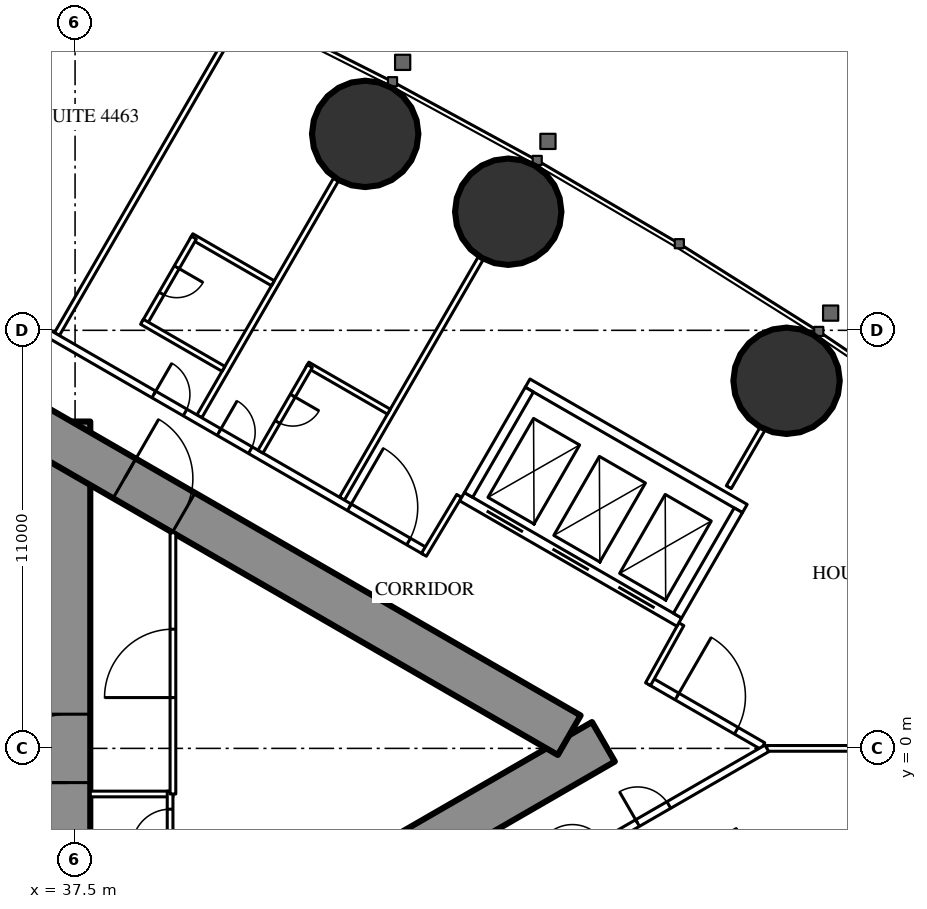
"""IFC4 building model, lengths in metres.
Left out: names, types, materials, properties, quantities, classifications, styles, units other than length and angle.
Written with IfcOpenShell. Run it as: python <this file> out.ifc"""

import sys

from ifc_helpers import new_model, si_unit, direction, frame, frame_2d, origin, origin_2d, place, context, subcontext, project, spatial, rectangle, circle, extrude, element, fill, save


model = new_model("IFC4")
c1 = context("Model", 3, precision=1e-05, world=origin(), true_north=direction((0.0, 1.0)))
c2 = subcontext(c1, "Body", "Model", "MODEL_VIEW")
j1 = project(units=[si_unit("LENGTHUNIT", "METRE"), si_unit("PLANEANGLEUNIT", "RADIAN")], contexts=[c1])
p1 = place(None, origin())
s1 = spatial("IfcSite", under=j1, at=p1, CompositionType="ELEMENT")
p2 = place(p1, origin())
s2 = spatial("IfcBuilding", under=s1, at=p2, CompositionType="ELEMENT")
p3 = place(p2, frame((0.0, 0.0, 166.8)))
s3 = spatial("IfcBuildingStorey", under=s2, at=p3, CompositionType="ELEMENT", Elevation=166.8)
for number, where, z_axis, x_axis in (
    (1, (56.221, 9.672, 0.0), (0.0, 0.0, 1.0), (1.0, 0.0, 0.0)),
    (2, (48.897, 14.121, 0.0), (0.0, 0.0, 1.0), (1.0, 0.0, 0.0)),
    (3, (45.134, 16.168, 0.0), (0.0, 0.0, 1.0), (1.0, 0.0, 0.0)),
):
    element("IfcColumn", number, at=place(p3, frame(where, z_axis=z_axis, x_axis=x_axis)), inside=s3, PredefinedType="COLUMN", context=c2, shape_type="SweptSolid", body=[
        extrude(circle(Radius=1.4, at=origin_2d()), origin(), (0.0, 0.0, 1.0), 3.5),
    ])
p4 = place(p3, frame((37.3, -8.6, 0.0), z_axis=(0.0, 0.0, 1.0), x_axis=(0.0, 1.0, 0.0)))
e4 = element("IfcWall", 4, at=p4, inside=s3, PredefinedType="SHEAR", context=c2, shape_type="SweptSolid", body=[
    extrude(rectangle(XDim=17.2, YDim=1.2, at=frame_2d((8.6, 0.0))), origin(), (0.0, 0.0, 1.0), 3.5),
])
p5 = place(p4, frame((7.7, 0.0, 0.0)))
e5 = element("IfcOpeningElement", 5, at=p5, cuts=e4, PredefinedType="OPENING", context=c2, shape_type="SweptSolid", body=[
    extrude(rectangle(XDim=1.8, YDim=2.2, at=frame_2d((0.9, 1.1))), frame((0.0, 0.61, 0.0), z_axis=(0.0, -1.0, 0.0), x_axis=(1.0, 0.0, 0.0)), (0.0, 0.0, 1.0), 1.22),
])
p6 = place(p3, frame((27.2, -13.8, 0.0), z_axis=(0.0, 0.0, 1.0), x_axis=(0.866027159892, 0.499996958321, 0.0)))
e6 = element("IfcWall", 6, at=p6, inside=s3, PredefinedType="SHEAR", context=c2, shape_type="SweptSolid", body=[
    extrude(rectangle(XDim=27.947, YDim=1.2, at=frame_2d((13.973, 0.0))), origin(), (0.0, 0.0, 1.0), 3.5),
])
p7 = place(p6, frame((4.6, 0.0, 0.0)))
e7 = element("IfcOpeningElement", 7, at=p7, cuts=e6, PredefinedType="OPENING", context=c2, shape_type="SweptSolid", body=[
    extrude(rectangle(XDim=1.0, YDim=2.2, at=frame_2d((0.5, 1.1))), frame((0.0, 0.61, 0.0), z_axis=(0.0, -1.0, 0.0), x_axis=(1.0, 0.0, 0.0)), (0.0, 0.0, 1.0), 1.22),
])
p8 = place(p6, frame((13.395, 0.0, 0.0)))
e8 = element("IfcOpeningElement", 8, at=p8, cuts=e6, PredefinedType="OPENING", context=c2, shape_type="SweptSolid", body=[
    extrude(rectangle(XDim=1.8, YDim=2.2, at=frame_2d((0.9, 1.1))), frame((0.0, 0.61, 0.0), z_axis=(0.0, -1.0, 0.0), x_axis=(1.0, 0.0, 0.0)), (0.0, 0.0, 1.0), 1.22),
])
p9 = place(p3, frame((27.2, 13.8, 0.0), z_axis=(0.0, 0.0, 1.0), x_axis=(0.866024515034, -0.500001539357, 0.0)))
e9 = element("IfcWall", 9, at=p9, inside=s3, PredefinedType="SHEAR", context=c2, shape_type="SweptSolid", body=[
    extrude(rectangle(XDim=26.907, YDim=1.2, at=frame_2d((13.454, 0.0))), origin(), (0.0, 0.0, 1.0), 3.5),
])
p10 = place(p9, frame((4.6, 0.0, 0.0)))
e10 = element("IfcOpeningElement", 10, at=p10, cuts=e9, PredefinedType="OPENING", context=c2, shape_type="SweptSolid", body=[
    extrude(rectangle(XDim=1.0, YDim=2.2, at=frame_2d((0.5, 1.1))), frame((0.0, 0.61, 0.0), z_axis=(0.0, -1.0, 0.0), x_axis=(1.0, 0.0, 0.0)), (0.0, 0.0, 1.0), 1.22),
])
p11 = place(p9, frame((13.395, 0.0, 0.0)))
e11 = element("IfcOpeningElement", 11, at=p11, cuts=e9, PredefinedType="OPENING", context=c2, shape_type="SweptSolid", body=[
    extrude(rectangle(XDim=1.8, YDim=2.2, at=frame_2d((0.9, 1.1))), frame((0.0, 0.61, 0.0), z_axis=(0.0, -1.0, 0.0), x_axis=(1.0, 0.0, 0.0)), (0.0, 0.0, 1.0), 1.22),
])
p12 = place(p3, frame((37.022, 10.9, 0.0), z_axis=(0.0, 0.0, 1.0), x_axis=(0.499998620953, 0.866026199976, 0.0)))
e12 = element("IfcWall", 12, at=p12, inside=s3, PredefinedType="PARTITIONING", context=c2, shape_type="SweptSolid", body=[
    extrude(rectangle(XDim=9.77, YDim=0.15, at=frame_2d((4.885, 0.0))), origin(), (0.0, 0.0, 1.0), 3.25),
])
p13 = place(p3, frame((40.769, 8.737, 0.0), z_axis=(0.0, 0.0, 1.0), x_axis=(0.500013115284, 0.866017831539, 0.0)))
e13 = element("IfcWall", 13, at=p13, inside=s3, PredefinedType="PARTITIONING", context=c2, shape_type="SweptSolid", body=[
    extrude(rectangle(XDim=7.198, YDim=0.15, at=frame_2d((3.599, 0.0))), origin(), (0.0, 0.0, 1.0), 2.3),
])
p14 = place(p3, frame((44.521, 6.571, 0.0), z_axis=(0.0, 0.0, 1.0), x_axis=(0.500020376429, 0.866013639128, 0.0)))
e14 = element("IfcWall", 14, at=p14, inside=s3, PredefinedType="PARTITIONING", context=c2, shape_type="SweptSolid", body=[
    extrude(rectangle(XDim=7.306, YDim=0.15, at=frame_2d((3.653, 0.0))), origin(), (0.0, 0.0, 1.0), 2.3),
])
p15 = place(p3, frame((55.702, 0.0, 0.0), z_axis=(0.0, 0.0, 1.0), x_axis=(1.0, 0.0, 0.0)))
e15 = element("IfcWall", 15, at=p15, inside=s3, PredefinedType="PARTITIONING", context=c2, shape_type="SweptSolid", body=[
    extrude(rectangle(XDim=8.518, YDim=0.15, at=frame_2d((4.259, 0.0))), origin(), (0.0, 0.0, 1.0), 2.3),
])
p16 = place(p3, frame((54.7, 6.872, 0.0), z_axis=(0.0, 0.0, 1.0), x_axis=(0.499989690894, 0.866031355668, 0.0)))
e16 = element("IfcWall", 16, at=p16, inside=s3, PredefinedType="PARTITIONING", context=c2, shape_type="SweptSolid", body=[
    extrude(rectangle(XDim=1.766, YDim=0.15, at=frame_2d((0.883, 0.0))), origin(), (0.0, 0.0, 1.0), 3.25),
])
p17 = place(p3, frame((27.959, 16.017, 0.0), z_axis=(0.0, 0.0, 1.0), x_axis=(0.866027146794, -0.499996981007, 0.0)))
e17 = element("IfcWall", 17, at=p17, inside=s3, PredefinedType="PARTITIONING", context=c2, shape_type="SweptSolid", body=[
    extrude(rectangle(XDim=21.657, YDim=0.2, at=frame_2d((10.829, 0.0))), origin(), (0.0, 0.0, 1.0), 3.25),
])
p18 = place(p17, frame((15.391, 0.0, 0.0)))
e18 = element("IfcOpeningElement", 18, at=p18, cuts=e17, PredefinedType="OPENING", context=c2, shape_type="SweptSolid", body=[
    extrude(rectangle(XDim=0.95, YDim=2.2, at=frame_2d((0.475, 1.1))), frame((0.0, 0.11, 0.0), z_axis=(0.0, -1.0, 0.0), x_axis=(1.0, 0.0, 0.0)), (0.0, 0.0, 1.0), 0.22),
])
p19 = place(p17, frame((13.409, 0.0, 0.0)))
e19 = element("IfcOpeningElement", 19, at=p19, cuts=e17, PredefinedType="OPENING", context=c2, shape_type="SweptSolid", body=[
    extrude(rectangle(XDim=0.95, YDim=2.2, at=frame_2d((0.475, 1.1))), frame((0.0, 0.11, 0.0), z_axis=(0.0, -1.0, 0.0), x_axis=(1.0, 0.0, 0.0)), (0.0, 0.0, 1.0), 0.22),
])
p20 = place(p17, frame((0.6, 0.0, 0.0)))
e20 = element("IfcOpeningElement", 20, at=p20, cuts=e17, PredefinedType="OPENING", context=c2, shape_type="SweptSolid", body=[
    extrude(rectangle(XDim=0.95, YDim=2.2, at=frame_2d((0.475, 1.1))), frame((0.0, 0.11, 0.0), z_axis=(0.0, -1.0, 0.0), x_axis=(1.0, 0.0, 0.0)), (0.0, 0.0, 1.0), 0.22),
])
p21 = place(p17, frame((19.349, 0.0, 0.0)))
e21 = element("IfcOpeningElement", 21, at=p21, cuts=e17, PredefinedType="OPENING", context=c2, shape_type="SweptSolid", body=[
    extrude(rectangle(XDim=1.8, YDim=2.2, at=frame_2d((0.9, 1.1))), frame((0.0, 0.11, 0.0), z_axis=(0.0, -1.0, 0.0), x_axis=(1.0, 0.0, 0.0)), (0.0, 0.0, 1.0), 0.22),
])
p22 = place(p3, frame((52.639, 1.769, 0.0), z_axis=(0.0, 0.0, 1.0), x_axis=(0.866027340901, -0.4999966448, 0.0)))
e22 = element("IfcWall", 22, at=p22, inside=s3, PredefinedType="PARTITIONING", context=c2, shape_type="SweptSolid", body=[
    extrude(rectangle(XDim=3.417, YDim=0.2, at=frame_2d((1.708, 0.0))), origin(), (0.0, 0.0, 1.0), 3.25),
])
p23 = place(p22, frame((0.809, 0.0, 0.0)))
e23 = element("IfcOpeningElement", 23, at=p23, cuts=e22, PredefinedType="OPENING", context=c2, shape_type="SweptSolid", body=[
    extrude(rectangle(XDim=1.8, YDim=2.2, at=frame_2d((0.9, 1.1))), frame((0.0, 0.11, 0.0), z_axis=(0.0, -1.0, 0.0), x_axis=(1.0, 0.0, 0.0)), (0.0, 0.0, 1.0), 0.22),
])
p24 = place(p3, frame((52.576, 1.689, 0.0), z_axis=(0.0, 0.0, 1.0), x_axis=(0.485424724123, 0.874278466629, 0.0)))
e24 = element("IfcWall", 24, at=p24, inside=s3, PredefinedType="PARTITIONING", context=c2, shape_type="SweptSolid", body=[
    extrude(rectangle(XDim=1.805, YDim=0.15, at=frame_2d((0.903, 0.0))), origin(), (0.0, 0.0, 1.0), 3.25),
])
p25 = place(p3, frame((47.606, 6.643, 0.0), z_axis=(0.0, 0.0, 1.0), x_axis=(-0.514237157483, -0.857648031458, 0.0)))
e25 = element("IfcWall", 25, at=p25, inside=s3, PredefinedType="PARTITIONING", context=c2, shape_type="SweptSolid", body=[
    extrude(rectangle(XDim=1.805, YDim=0.15, at=frame_2d((0.902, 0.0))), origin(), (0.0, 0.0, 1.0), 3.25),
])
p26 = place(p3, frame((40.741, -8.638, 0.0), z_axis=(0.0, 0.0, 1.0), x_axis=(0.866022967338, 0.500004220025, 0.0)))
e26 = element("IfcWall", 26, at=p26, inside=s3, PredefinedType="PARTITIONING", context=c2, shape_type="SweptSolid", body=[
    extrude(rectangle(XDim=17.276, YDim=0.2, at=frame_2d((8.638, 0.0))), origin(), (0.0, 0.0, 1.0), 3.25),
])
p27 = place(p26, frame((7.316, 0.0, 0.0)))
e27 = element("IfcOpeningElement", 27, at=p27, cuts=e26, PredefinedType="OPENING", context=c2, shape_type="SweptSolid", body=[
    extrude(rectangle(XDim=0.95, YDim=2.2, at=frame_2d((0.475, 1.1))), frame((0.0, 0.11, 0.0), z_axis=(0.0, -1.0, 0.0), x_axis=(1.0, 0.0, 0.0)), (0.0, 0.0, 1.0), 0.22),
])
p28 = place(p26, frame((11.366, 0.0, 0.0)))
e28 = element("IfcOpeningElement", 28, at=p28, cuts=e26, PredefinedType="OPENING", context=c2, shape_type="SweptSolid", body=[
    extrude(rectangle(XDim=0.95, YDim=2.2, at=frame_2d((0.475, 1.1))), frame((0.0, 0.11, 0.0), z_axis=(0.0, -1.0, 0.0), x_axis=(1.0, 0.0, 0.0)), (0.0, 0.0, 1.0), 0.22),
])
p29 = place(p26, frame((13.347, 0.0, 0.0)))
e29 = element("IfcOpeningElement", 29, at=p29, cuts=e26, PredefinedType="OPENING", context=c2, shape_type="SweptSolid", body=[
    extrude(rectangle(XDim=0.95, YDim=2.2, at=frame_2d((0.475, 1.1))), frame((0.0, 0.11, 0.0), z_axis=(0.0, -1.0, 0.0), x_axis=(1.0, 0.0, 0.0)), (0.0, 0.0, 1.0), 0.22),
])
p30 = place(p3, frame((52.79, -3.413, 0.0), z_axis=(0.0, 0.0, 1.0), x_axis=(0.866006523861, 0.500032699561, 0.0)))
e30 = element("IfcWall", 30, at=p30, inside=s3, PredefinedType="PARTITIONING", context=c2, shape_type="SweptSolid", body=[
    extrude(rectangle(XDim=2.475, YDim=0.15, at=frame_2d((1.237, 0.0))), origin(), (0.0, 0.0, 1.0), 3.25),
])
p31 = place(p3, frame((43.613, 10.097, 0.0), z_axis=(0.0, 0.0, 1.0), x_axis=(0.866031185235, -0.4999899861, 0.0)))
e31 = element("IfcWall", 31, at=p31, inside=s3, PredefinedType="PARTITIONING", context=c2, shape_type="SweptSolid", body=[
    extrude(rectangle(XDim=2.475, YDim=0.15, at=frame_2d((1.238, 0.0))), origin(), (0.0, 0.0, 1.0), 3.25),
])
p32 = place(p3, frame((42.378, 7.808, 0.0), z_axis=(0.0, 0.0, 1.0), x_axis=(0.500006934395, 0.866021400173, 0.0)))
e32 = element("IfcWall", 32, at=p32, inside=s3, PredefinedType="PARTITIONING", context=c2, shape_type="SweptSolid", body=[
    extrude(rectangle(XDim=2.6, YDim=0.15, at=frame_2d((1.3, 0.0))), origin(), (0.0, 0.0, 1.0), 3.25),
])
p33 = place(p32, frame((0.9, 0.0, 0.0)))
e33 = element("IfcOpeningElement", 33, at=p33, cuts=e32, PredefinedType="OPENING", context=c2, shape_type="SweptSolid", body=[
    extrude(rectangle(XDim=0.8, YDim=2.2, at=frame_2d((0.4, 1.1))), frame((0.0, 0.085, 0.0), z_axis=(0.0, -1.0, 0.0), x_axis=(1.0, 0.0, 0.0)), (0.0, 0.0, 1.0), 0.17),
])
p34 = place(p3, frame((40.561, 13.476, 0.0), z_axis=(0.0, 0.0, 1.0), x_axis=(0.866006523861, -0.500032699561, 0.0)))
e34 = element("IfcWall", 34, at=p34, inside=s3, PredefinedType="PARTITIONING", context=c2, shape_type="SweptSolid", body=[
    extrude(rectangle(XDim=2.475, YDim=0.15, at=frame_2d((1.237, 0.0))), origin(), (0.0, 0.0, 1.0), 3.25),
])
p35 = place(p3, frame((39.326, 11.187, 0.0), z_axis=(0.0, 0.0, 1.0), x_axis=(0.500047596559, 0.865997922154, 0.0)))
e35 = element("IfcWall", 35, at=p35, inside=s3, PredefinedType="PARTITIONING", context=c2, shape_type="SweptSolid", body=[
    extrude(rectangle(XDim=2.6, YDim=0.15, at=frame_2d((1.3, 0.0))), origin(), (0.0, 0.0, 1.0), 3.25),
])
p36 = place(p35, frame((0.9, 0.0, 0.0)))
e36 = element("IfcOpeningElement", 36, at=p36, cuts=e35, PredefinedType="OPENING", context=c2, shape_type="SweptSolid", body=[
    extrude(rectangle(XDim=0.8, YDim=2.2, at=frame_2d((0.4, 1.1))), frame((0.0, 0.085, 0.0), z_axis=(0.0, -1.0, 0.0), x_axis=(1.0, 0.0, 0.0)), (0.0, 0.0, 1.0), 0.17),
])
p37 = place(p3, frame((39.261, 11.224, 0.0), z_axis=(0.0, 0.0, 1.0), x_axis=(0.866006523861, -0.500032699561, 0.0)))
e37 = element("IfcWall", 37, at=p37, inside=s3, PredefinedType="PARTITIONING", context=c2, shape_type="SweptSolid", body=[
    extrude(rectangle(XDim=2.475, YDim=0.15, at=frame_2d((1.237, 0.0))), origin(), (0.0, 0.0, 1.0), 3.25),
])
p38 = place(p3, frame((37.9, -1.2, 0.0), z_axis=(0.0, 0.0, 1.0), x_axis=(1.0, 0.0, 0.0)))
e38 = element("IfcWall", 38, at=p38, inside=s3, PredefinedType="PARTITIONING", context=c2, shape_type="SweptSolid", body=[
    extrude(rectangle(XDim=2.175, YDim=0.15, at=frame_2d((1.087, 0.0))), origin(), (0.0, 0.0, 1.0), 3.25),
])
p39 = place(p3, frame((40.0, -3.075, 0.0), z_axis=(0.0, 0.0, 1.0), x_axis=(0.0, 1.0, 0.0)))
e39 = element("IfcWall", 39, at=p39, inside=s3, PredefinedType="PARTITIONING", context=c2, shape_type="SweptSolid", body=[
    extrude(rectangle(XDim=1.95, YDim=0.15, at=frame_2d((0.975, 0.0))), origin(), (0.0, 0.0, 1.0), 3.25),
])
p40 = place(p39, frame((0.475, 0.0, 0.0)))
e40 = element("IfcOpeningElement", 40, at=p40, cuts=e39, PredefinedType="OPENING", context=c2, shape_type="SweptSolid", body=[
    extrude(rectangle(XDim=1.0, YDim=2.2, at=frame_2d((0.5, 1.1))), frame((0.0, 0.085, 0.0), z_axis=(0.0, -1.0, 0.0), x_axis=(1.0, 0.0, 0.0)), (0.0, 0.0, 1.0), 0.17),
])
p41 = place(p3, frame((40.075, -1.2, 0.0), z_axis=(0.0, 0.0, 1.0), x_axis=(0.0, 1.0, 0.0)))
e41 = element("IfcWall", 41, at=p41, inside=s3, PredefinedType="PARTITIONING", context=c2, shape_type="SweptSolid", body=[
    extrude(rectangle(XDim=6.874, YDim=0.15, at=frame_2d((3.437, 0.0))), origin(), (0.0, 0.0, 1.0), 3.25),
])
p42 = place(p41, frame((2.537, 0.0, 0.0)))
e42 = element("IfcOpeningElement", 42, at=p42, cuts=e41, PredefinedType="OPENING", context=c2, shape_type="SweptSolid", body=[
    extrude(rectangle(XDim=1.8, YDim=2.2, at=frame_2d((0.9, 1.1))), frame((0.0, 0.085, 0.0), z_axis=(0.0, -1.0, 0.0), x_axis=(1.0, 0.0, 0.0)), (0.0, 0.0, 1.0), 0.17),
])
p43 = place(p3, frame((47.681, 6.622, 0.0), z_axis=(0.0, 0.0, 1.0), x_axis=(0.86603344179, -0.499986077507, 0.0)))
e43 = element("IfcWall", 43, at=p43, inside=s3, PredefinedType="PARTITIONING", context=c2, shape_type="SweptSolid", body=[
    extrude(rectangle(XDim=6.6, YDim=0.25, at=frame_2d((3.3, 0.0))), origin(), (0.0, 0.0, 1.0), 3.25),
])
p44 = place(p43, frame((0.75, 0.0, 0.0)))
e44 = element("IfcOpeningElement", 44, at=p44, cuts=e43, PredefinedType="OPENING", context=c2, shape_type="SweptSolid", body=[
    extrude(rectangle(XDim=1.1, YDim=2.2, at=frame_2d((0.55, 1.1))), frame((0.0, 0.135, 0.0), z_axis=(0.0, -1.0, 0.0), x_axis=(1.0, 0.0, 0.0)), (0.0, 0.0, 1.0), 0.27),
])
p45 = place(p43, frame((2.75, 0.0, 0.0)))
e45 = element("IfcOpeningElement", 45, at=p45, cuts=e43, PredefinedType="OPENING", context=c2, shape_type="SweptSolid", body=[
    extrude(rectangle(XDim=1.1, YDim=2.2, at=frame_2d((0.55, 1.1))), frame((0.0, 0.135, 0.0), z_axis=(0.0, -1.0, 0.0), x_axis=(1.0, 0.0, 0.0)), (0.0, 0.0, 1.0), 0.27),
])
p46 = place(p43, frame((4.75, 0.0, 0.0)))
e46 = element("IfcOpeningElement", 46, at=p46, cuts=e43, PredefinedType="OPENING", context=c2, shape_type="SweptSolid", body=[
    extrude(rectangle(XDim=1.1, YDim=2.2, at=frame_2d((0.55, 1.1))), frame((0.0, 0.135, 0.0), z_axis=(0.0, -1.0, 0.0), x_axis=(1.0, 0.0, 0.0)), (0.0, 0.0, 1.0), 0.27),
])
p47 = place(p3, frame((49.406, 9.611, 0.0), z_axis=(0.0, 0.0, 1.0), x_axis=(0.86603344179, -0.499986077507, 0.0)))
e47 = element("IfcWall", 47, at=p47, inside=s3, PredefinedType="PARTITIONING", context=c2, shape_type="SweptSolid", body=[
    extrude(rectangle(XDim=6.6, YDim=0.25, at=frame_2d((3.3, 0.0))), origin(), (0.0, 0.0, 1.0), 3.25),
])
p48 = place(p3, frame((47.852, 6.668, 0.0), z_axis=(0.0, 0.0, 1.0), x_axis=(0.499929347863, 0.866066190972, 0.0)))
e48 = element("IfcWall", 48, at=p48, inside=s3, PredefinedType="PARTITIONING", context=c2, shape_type="SweptSolid", body=[
    extrude(rectangle(XDim=3.201, YDim=0.25, at=frame_2d((1.6, 0.0))), origin(), (0.0, 0.0, 1.0), 3.25),
])
p49 = place(p3, frame((53.352, 3.493, 0.0), z_axis=(0.0, 0.0, 1.0), x_axis=(0.499872130319, 0.866099216793, 0.0)))
e49 = element("IfcWall", 49, at=p49, inside=s3, PredefinedType="PARTITIONING", context=c2, shape_type="SweptSolid", body=[
    extrude(rectangle(XDim=3.2, YDim=0.25, at=frame_2d((1.6, 0.0))), origin(), (0.0, 0.0, 1.0), 3.25),
])
p50 = place(p29, origin())
e50 = element("IfcDoor", 50, at=p50, inside=s3, OperationType="SINGLE_SWING_LEFT", PredefinedType="DOOR", context=c2, shape_type="SweptSolid", body=[
    extrude(rectangle(XDim=0.95, YDim=2.2, at=frame_2d((0.475, 1.1))), frame((0.0, 0.025, 0.0), z_axis=(0.0, -1.0, 0.0), x_axis=(1.0, 0.0, 0.0)), (0.0, 0.0, 1.0), 0.05),
])
fill(e29, e50)
p51 = place(p33, origin())
e51 = element("IfcDoor", 51, at=p51, inside=s3, OperationType="SINGLE_SWING_RIGHT", PredefinedType="DOOR", context=c2, shape_type="SweptSolid", body=[
    extrude(rectangle(XDim=0.8, YDim=2.2, at=frame_2d((0.4, 1.1))), frame((0.0, 0.025, 0.0), z_axis=(0.0, -1.0, 0.0), x_axis=(1.0, 0.0, 0.0)), (0.0, 0.0, 1.0), 0.05),
])
fill(e33, e51)
p52 = place(p18, origin())
e52 = element("IfcDoor", 52, at=p52, inside=s3, OperationType="SINGLE_SWING_LEFT", PredefinedType="DOOR", context=c2, shape_type="SweptSolid", body=[
    extrude(rectangle(XDim=0.95, YDim=2.2, at=frame_2d((0.475, 1.1))), frame((0.0, 0.025, 0.0), z_axis=(0.0, -1.0, 0.0), x_axis=(1.0, 0.0, 0.0)), (0.0, 0.0, 1.0), 0.05),
])
fill(e18, e52)
p53 = place(p36, origin())
e53 = element("IfcDoor", 53, at=p53, inside=s3, OperationType="SINGLE_SWING_RIGHT", PredefinedType="DOOR", context=c2, shape_type="SweptSolid", body=[
    extrude(rectangle(XDim=0.8, YDim=2.2, at=frame_2d((0.4, 1.1))), frame((0.0, 0.025, 0.0), z_axis=(0.0, -1.0, 0.0), x_axis=(1.0, 0.0, 0.0)), (0.0, 0.0, 1.0), 0.05),
])
fill(e36, e53)
p54 = place(p19, origin())
e54 = element("IfcDoor", 54, at=p54, inside=s3, OperationType="SINGLE_SWING_LEFT", PredefinedType="DOOR", context=c2, shape_type="SweptSolid", body=[
    extrude(rectangle(XDim=0.95, YDim=2.2, at=frame_2d((0.475, 1.1))), frame((0.0, 0.025, 0.0), z_axis=(0.0, -1.0, 0.0), x_axis=(1.0, 0.0, 0.0)), (0.0, 0.0, 1.0), 0.05),
])
fill(e19, e54)
p55 = place(p23, origin())
e55 = element("IfcDoor", 55, at=p55, inside=s3, OperationType="DOUBLE_DOOR_SINGLE_SWING", PredefinedType="DOOR", context=c2, shape_type="SweptSolid", body=[
    extrude(rectangle(XDim=1.8, YDim=2.2, at=frame_2d((0.9, 1.1))), frame((0.0, 0.025, 0.0), z_axis=(0.0, -1.0, 0.0), x_axis=(1.0, 0.0, 0.0)), (0.0, 0.0, 1.0), 0.05),
])
fill(e23, e55)
p56 = place(p21, origin())
e56 = element("IfcDoor", 56, at=p56, inside=s3, OperationType="DOUBLE_DOOR_SINGLE_SWING", PredefinedType="DOOR", context=c2, shape_type="SweptSolid", body=[
    extrude(rectangle(XDim=1.8, YDim=2.2, at=frame_2d((0.9, 1.1))), frame((0.0, 0.025, 0.0), z_axis=(0.0, -1.0, 0.0), x_axis=(1.0, 0.0, 0.0)), (0.0, 0.0, 1.0), 0.05),
])
fill(e21, e56)
p57 = place(p40, origin())
e57 = element("IfcDoor", 57, at=p57, inside=s3, OperationType="SINGLE_SWING_LEFT", PredefinedType="DOOR", context=c2, shape_type="SweptSolid", body=[
    extrude(rectangle(XDim=1.0, YDim=2.2, at=frame_2d((0.5, 1.1))), frame((0.0, 0.025, 0.0), z_axis=(0.0, -1.0, 0.0), x_axis=(1.0, 0.0, 0.0)), (0.0, 0.0, 1.0), 0.05),
])
fill(e40, e57)
p58 = place(p42, origin())
e58 = element("IfcDoor", 58, at=p58, inside=s3, OperationType="DOUBLE_DOOR_SINGLE_SWING", PredefinedType="DOOR", context=c2, shape_type="SweptSolid", body=[
    extrude(rectangle(XDim=1.8, YDim=2.2, at=frame_2d((0.9, 1.1))), frame((0.0, 0.025, 0.0), z_axis=(0.0, -1.0, 0.0), x_axis=(1.0, 0.0, 0.0)), (0.0, 0.0, 1.0), 0.05),
])
fill(e42, e58)
p59 = place(p11, origin())
e59 = element("IfcDoor", 59, at=p59, inside=s3, OperationType="DOUBLE_DOOR_SINGLE_SWING", PredefinedType="DOOR", context=c2, shape_type="SweptSolid", body=[
    extrude(rectangle(XDim=1.8, YDim=2.2, at=frame_2d((0.9, 1.1))), frame((0.0, 0.025, 0.0), z_axis=(0.0, -1.0, 0.0), x_axis=(1.0, 0.0, 0.0)), (0.0, 0.0, 1.0), 0.05),
])
fill(e11, e59)
p60 = place(p5, origin())
e60 = element("IfcDoor", 60, at=p60, inside=s3, OperationType="DOUBLE_DOOR_SINGLE_SWING", PredefinedType="DOOR", context=c2, shape_type="SweptSolid", body=[
    extrude(rectangle(XDim=1.8, YDim=2.2, at=frame_2d((0.9, 1.1))), frame((0.0, 0.025, 0.0), z_axis=(0.0, -1.0, 0.0), x_axis=(1.0, 0.0, 0.0)), (0.0, 0.0, 1.0), 0.05),
])
fill(e5, e60)
p61 = place(p44, origin())
e61 = element("IfcDoor", 61, at=p61, inside=s3, OperationType="DOUBLE_DOOR_SLIDING", PredefinedType="USERDEFINED", context=c2, shape_type="SweptSolid", body=[
    extrude(rectangle(XDim=1.1, YDim=2.2, at=frame_2d((0.55, 1.1))), frame((0.0, 0.025, 0.0), z_axis=(0.0, -1.0, 0.0), x_axis=(1.0, 0.0, 0.0)), (0.0, 0.0, 1.0), 0.05),
])
fill(e44, e61)
p62 = place(p45, origin())
e62 = element("IfcDoor", 62, at=p62, inside=s3, OperationType="DOUBLE_DOOR_SLIDING", PredefinedType="USERDEFINED", context=c2, shape_type="SweptSolid", body=[
    extrude(rectangle(XDim=1.1, YDim=2.2, at=frame_2d((0.55, 1.1))), frame((0.0, 0.025, 0.0), z_axis=(0.0, -1.0, 0.0), x_axis=(1.0, 0.0, 0.0)), (0.0, 0.0, 1.0), 0.05),
])
fill(e45, e62)
p63 = place(p46, origin())
e63 = element("IfcDoor", 63, at=p63, inside=s3, OperationType="DOUBLE_DOOR_SLIDING", PredefinedType="USERDEFINED", context=c2, shape_type="SweptSolid", body=[
    extrude(rectangle(XDim=1.1, YDim=2.2, at=frame_2d((0.55, 1.1))), frame((0.0, 0.025, 0.0), z_axis=(0.0, -1.0, 0.0), x_axis=(1.0, 0.0, 0.0)), (0.0, 0.0, 1.0), 0.05),
])
fill(e46, e63)
save(model, sys.argv[1])
